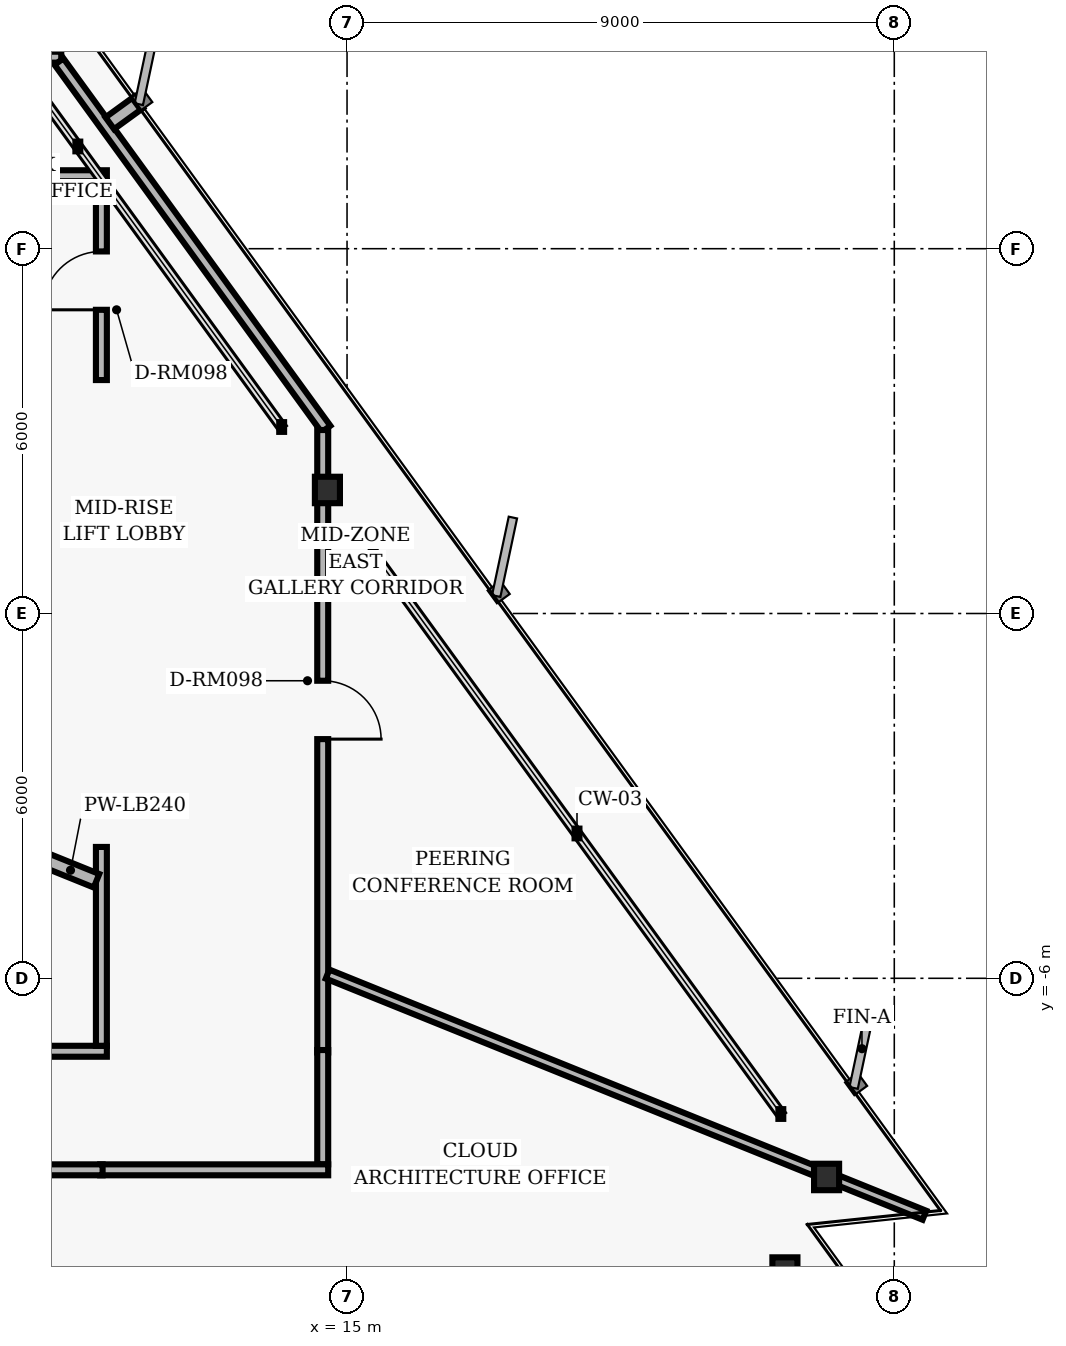
"""IFC4 building model, lengths in metres.
Left out: names, types, materials, properties, quantities, classifications, styles, units other than length and angle.
Written with IfcOpenShell. Run it as: python <this file> out.ifc"""

import sys

from ifc_helpers import new_model, si_unit, direction, frame, frame_2d, origin, origin_2d, place, context, subcontext, project, spatial, rectangle, i_section, extrude, element, fill, save


model = new_model("IFC4")
c1 = context("Model", 3, precision=1e-05, world=origin(), true_north=direction((0.0, 1.0)))
c2 = subcontext(c1, "Body", "Model", "MODEL_VIEW")
j1 = project(units=[si_unit("LENGTHUNIT", "METRE"), si_unit("PLANEANGLEUNIT", "RADIAN")], contexts=[c1])
p1 = place(None, origin())
s1 = spatial("IfcSite", under=j1, at=p1, CompositionType="ELEMENT")
p2 = place(p1, origin())
s2 = spatial("IfcBuilding", under=s1, at=p2, CompositionType="ELEMENT")
p3 = place(p2, frame((0.0, 0.0, 104.64)))
s3 = spatial("IfcBuildingStorey", under=s2, at=p3, CompositionType="ELEMENT", Elevation=104.64)
for number, where, z_axis, x_axis in (
    (1, (22.887, -9.268, 0.0), (0.0, 0.0, 1.0), (1.0, 0.0, 0.0)),
    (2, (14.677, 2.032, 0.0), (0.0, 0.0, 1.0), (1.0, 0.0, 0.0)),
    (3, (22.201, -10.807, 0.0), (0.0, 0.0, 1.0), (1.0, 0.0, 0.0)),
):
    element("IfcColumn", number, at=place(p3, frame(where, z_axis=z_axis, x_axis=x_axis)), inside=s3, PredefinedType="COLUMN", context=c2, shape_type="SweptSolid", body=[
        extrude(i_section(OverallWidth=0.412, OverallDepth=0.435, WebThickness=0.036, FlangeThickness=0.057, FilletRadius=0.022, at=origin_2d()), origin(), (0.0, 0.0, 1.0), 3.04),
    ])
p4 = place(p3, frame((-6.52, 9.15, 0.0), z_axis=(0.0, 0.0, 1.0), x_axis=(1.0, 0.0, 0.0)))
e4 = element("IfcWall", 4, at=p4, inside=s3, PredefinedType="PARTITIONING", context=c2, shape_type="SweptSolid", body=[
    extrude(rectangle(XDim=16.82, YDim=0.18, at=frame_2d((8.41, 0.0))), origin(), (0.0, 0.0, 1.0), 2.763),
])
p5 = place(p4, frame((10.898, 0.0, 0.0)))
e5 = element("IfcOpeningElement", 5, at=p5, cuts=e4, PredefinedType="OPENING", context=c2, shape_type="SweptSolid", body=[
    extrude(rectangle(XDim=0.96, YDim=2.02, at=frame_2d((0.48, 1.01))), frame((0.0, 0.1, 0.0), z_axis=(0.0, -1.0, 0.0), x_axis=(1.0, 0.0, 0.0)), (0.0, 0.0, 1.0), 0.2),
])
p6 = place(p4, frame((2.749, 0.0, 0.0)))
e6 = element("IfcOpeningElement", 6, at=p6, cuts=e4, PredefinedType="OPENING", context=c2, shape_type="SweptSolid", body=[
    extrude(rectangle(XDim=0.96, YDim=2.02, at=frame_2d((0.48, 1.01))), frame((0.0, 0.1, 0.0), z_axis=(0.0, -1.0, 0.0), x_axis=(1.0, 0.0, 0.0)), (0.0, 0.0, 1.0), 0.2),
])
p7 = place(p3, frame((10.263, 9.077, 0.0), z_axis=(0.0, 0.0, 1.0), x_axis=(0.587780951295, -0.809020119215, 0.0)))
e7 = element("IfcWall", 7, at=p7, inside=s3, PredefinedType="PARTITIONING", context=c2, shape_type="SweptSolid", body=[
    extrude(rectangle(XDim=7.469, YDim=0.18, at=frame_2d((3.734, 0.0))), origin(), (0.0, 0.0, 1.0), 2.763),
])
p8 = place(p3, frame((14.6, 3.018, 0.0), z_axis=(0.0, 0.0, 1.0), x_axis=(0.0, -1.0, 0.0)))
e8 = element("IfcWall", 8, at=p8, inside=s3, PredefinedType="PARTITIONING", context=c2, shape_type="SweptSolid", body=[
    extrude(rectangle(XDim=10.238, YDim=0.18, at=frame_2d((5.119, 0.0))), origin(), (0.0, 0.0, 1.0), 2.763),
])
p9 = place(p8, frame((4.124, 0.0, 0.0)))
e9 = element("IfcOpeningElement", 9, at=p9, cuts=e8, PredefinedType="OPENING", context=c2, shape_type="SweptSolid", body=[
    extrude(rectangle(XDim=0.96, YDim=2.02, at=frame_2d((0.48, 1.01))), frame((0.0, 0.1, 0.0), z_axis=(0.0, -1.0, 0.0), x_axis=(1.0, 0.0, 0.0)), (0.0, 0.0, 1.0), 0.2),
])
p10 = place(p3, frame((14.6, -7.18, 0.0), z_axis=(0.0, 0.0, 1.0), x_axis=(0.0, -1.0, 0.0)))
e10 = element("IfcWall", 10, at=p10, inside=s3, PredefinedType="PARTITIONING", context=c2, shape_type="SweptSolid", body=[
    extrude(rectangle(XDim=1.88, YDim=0.18, at=frame_2d((0.94, 0.0))), origin(), (0.0, 0.0, 1.0), 2.763),
])
p11 = place(p3, frame((14.69, -9.15, 0.0), z_axis=(0.0, 0.0, 1.0), x_axis=(-1.0, 0.0, 0.0)))
e11 = element("IfcWall", 11, at=p11, inside=s3, PredefinedType="PARTITIONING", context=c2, shape_type="SweptSolid", body=[
    extrude(rectangle(XDim=3.75, YDim=0.18, at=frame_2d((1.875, 0.0))), origin(), (0.0, 0.0, 1.0), 2.33),
])
p12 = place(p3, frame((10.98, -9.15, 0.0), z_axis=(0.0, 0.0, 1.0), x_axis=(-1.0, 0.0, 0.0)))
e12 = element("IfcWall", 12, at=p12, inside=s3, PredefinedType="PARTITIONING", context=c2, shape_type="SweptSolid", body=[
    extrude(rectangle(XDim=17.5, YDim=0.18, at=frame_2d((8.75, 0.0))), origin(), (0.0, 0.0, 1.0), 2.33),
])
p13 = place(p12, frame((13.145, 0.0, 0.0)))
e13 = element("IfcOpeningElement", 13, at=p13, cuts=e12, PredefinedType="OPENING", context=c2, shape_type="SweptSolid", body=[
    extrude(rectangle(XDim=0.96, YDim=2.02, at=frame_2d((0.48, 1.01))), frame((0.0, 0.1, 0.0), z_axis=(0.0, -1.0, 0.0), x_axis=(1.0, 0.0, 0.0)), (0.0, 0.0, 1.0), 0.2),
])
p14 = place(p12, frame((4.655, 0.0, 0.0)))
e14 = element("IfcOpeningElement", 14, at=p14, cuts=e12, PredefinedType="OPENING", context=c2, shape_type="SweptSolid", body=[
    extrude(rectangle(XDim=0.96, YDim=2.02, at=frame_2d((0.48, 1.01))), frame((0.0, 0.1, 0.0), z_axis=(0.0, -1.0, 0.0), x_axis=(1.0, 0.0, 0.0)), (0.0, 0.0, 1.0), 0.2),
])
p15 = place(p3, frame((5.53, -7.2, 0.0), z_axis=(0.0, 0.0, 1.0), x_axis=(1.0, 0.0, 0.0)))
e15 = element("IfcWall", 15, at=p15, inside=s3, PredefinedType="PARTITIONING", context=c2, shape_type="SweptSolid", body=[
    extrude(rectangle(XDim=5.52, YDim=0.18, at=frame_2d((2.76, 0.0))), origin(), (0.0, 0.0, 1.0), 2.33),
])
p16 = place(p15, frame((2.25, 0.0, 0.0)))
e16 = element("IfcOpeningElement", 16, at=p16, cuts=e15, PredefinedType="OPENING", context=c2, shape_type="SweptSolid", body=[
    extrude(rectangle(XDim=1.02, YDim=2.02, at=frame_2d((0.51, 1.01))), frame((0.0, 0.1, 0.0), z_axis=(0.0, -1.0, 0.0), x_axis=(1.0, 0.0, 0.0)), (0.0, 0.0, 1.0), 0.2),
])
p17 = place(p3, frame((10.96, -7.11, 0.0), z_axis=(0.0, 0.0, 1.0), x_axis=(0.0, 1.0, 0.0)))
e17 = element("IfcWall", 17, at=p17, inside=s3, PredefinedType="PARTITIONING", context=c2, shape_type="SweptSolid", body=[
    extrude(rectangle(XDim=3.271, YDim=0.18, at=frame_2d((1.635, 0.0))), origin(), (0.0, 0.0, 1.0), 2.763),
])
p18 = place(p3, frame((10.96, 3.84, 0.0), z_axis=(0.0, 0.0, 1.0), x_axis=(0.0, 1.0, 0.0)))
e18 = element("IfcWall", 18, at=p18, inside=s3, PredefinedType="PARTITIONING", context=c2, shape_type="SweptSolid", body=[
    extrude(rectangle(XDim=3.271, YDim=0.18, at=frame_2d((1.635, 0.0))), origin(), (0.0, 0.0, 1.0), 2.763),
])
p19 = place(p18, frame((1.155, 0.0, 0.0)))
e19 = element("IfcOpeningElement", 19, at=p19, cuts=e18, PredefinedType="OPENING", context=c2, shape_type="SweptSolid", body=[
    extrude(rectangle(XDim=0.96, YDim=2.02, at=frame_2d((0.48, 1.01))), frame((0.0, 0.1, 0.0), z_axis=(0.0, -1.0, 0.0), x_axis=(1.0, 0.0, 0.0)), (0.0, 0.0, 1.0), 0.2),
])
p20 = place(p3, frame((11.05, 7.2, 0.0), z_axis=(0.0, 0.0, 1.0), x_axis=(-1.0, 0.0, 0.0)))
e20 = element("IfcWall", 20, at=p20, inside=s3, PredefinedType="PARTITIONING", context=c2, shape_type="SweptSolid", body=[
    extrude(rectangle(XDim=5.12, YDim=0.18, at=frame_2d((2.56, 0.0))), origin(), (0.0, 0.0, 1.0), 2.763),
])
p21 = place(p3, frame((10.024, -4.05, 0.0), z_axis=(0.0, 0.0, 1.0), x_axis=(0.927194137639, -0.374581140912, 0.0)))
e21 = element("IfcWall", 21, at=p21, inside=s3, PredefinedType="PARTITIONING", context=c2, shape_type="SweptSolid", body=[
    extrude(rectangle(XDim=0.923, YDim=0.24, at=frame_2d((0.461, 0.0))), origin(), (0.0, 0.0, 1.0), 2.763),
])
p22 = place(p3, frame((14.68, -5.931, 0.0), z_axis=(0.0, 0.0, 1.0), x_axis=(0.927187622353, -0.374597267682, 0.0)))
e22 = element("IfcWall", 22, at=p22, inside=s3, PredefinedType="PARTITIONING", context=c2, shape_type="SweptSolid", body=[
    extrude(rectangle(XDim=10.586, YDim=0.16, at=frame_2d((5.293, 0.0))), origin(), (0.0, 0.0, 1.0), 2.132),
])
p23 = place(p3, frame((11.098, 8.063, 0.0), z_axis=(0.0, 0.0, 1.0), x_axis=(0.809093866449, 0.587679432408, 0.0)))
e23 = element("IfcWall", 23, at=p23, inside=s3, PredefinedType="PARTITIONING", context=c2, shape_type="SweptSolid", body=[
    extrude(rectangle(XDim=0.59, YDim=0.24, at=frame_2d((0.295, 0.0))), origin(), (0.0, 0.0, 1.0), 2.763),
])
p24 = place(p9, origin())
e24 = element("IfcDoor", 24, at=p24, inside=s3, OperationType="SINGLE_SWING_RIGHT", PredefinedType="DOOR", context=c2, shape_type="SweptSolid", body=[
    extrude(rectangle(XDim=0.96, YDim=2.02, at=frame_2d((0.48, 1.01))), frame((0.0, 0.025, 0.0), z_axis=(0.0, -1.0, 0.0), x_axis=(1.0, 0.0, 0.0)), (0.0, 0.0, 1.0), 0.05),
])
fill(e9, e24)
p25 = place(p19, origin())
e25 = element("IfcDoor", 25, at=p25, inside=s3, OperationType="SINGLE_SWING_LEFT", PredefinedType="DOOR", context=c2, shape_type="SweptSolid", body=[
    extrude(rectangle(XDim=0.96, YDim=2.02, at=frame_2d((0.48, 1.01))), frame((0.0, 0.025, 0.0), z_axis=(0.0, -1.0, 0.0), x_axis=(1.0, 0.0, 0.0)), (0.0, 0.0, 1.0), 0.05),
])
fill(e19, e25)
save(model, sys.argv[1])
